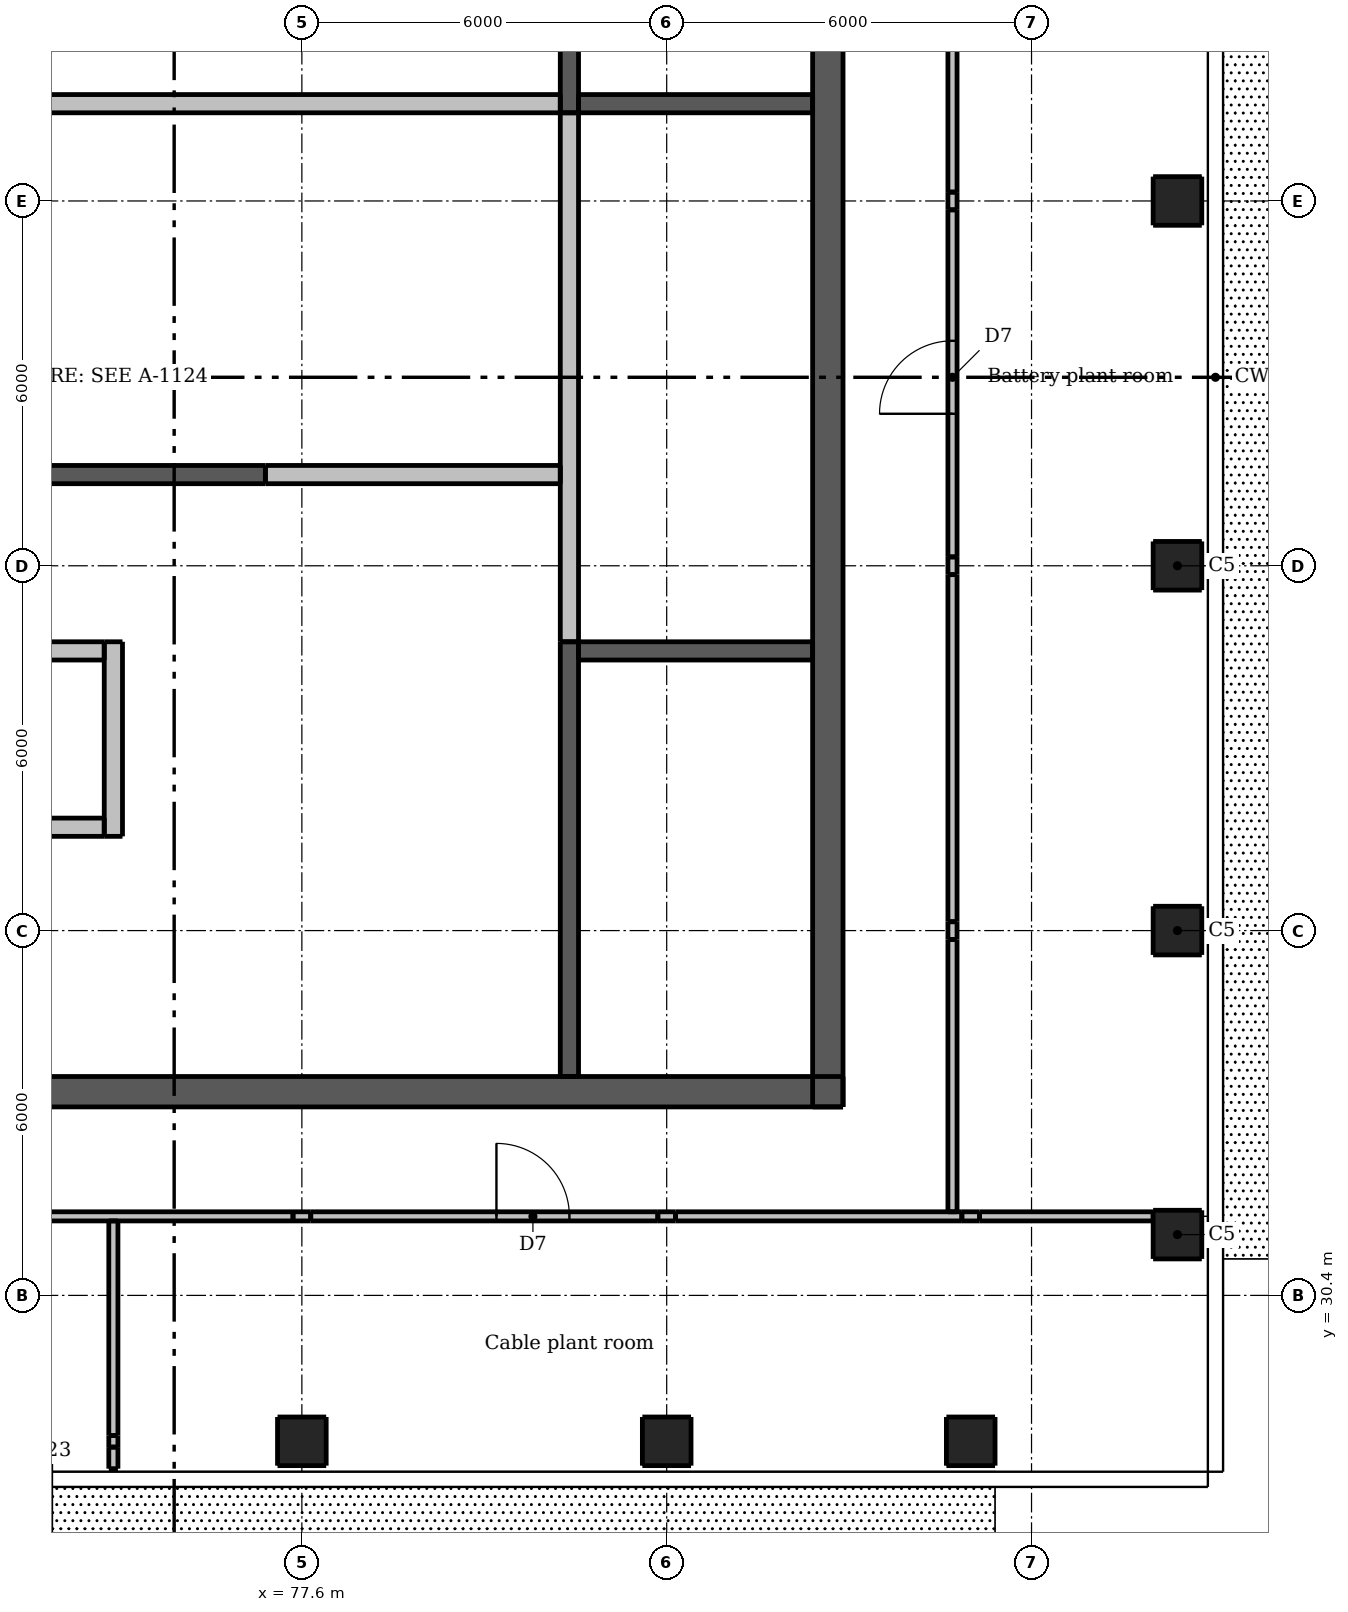
"""IFC4 building model, lengths in metres.
Left out: names, types, materials, properties, quantities, classifications, styles, units other than length and angle.
Written with IfcOpenShell. Run it as: python <this file> out.ifc"""

import sys

from ifc_helpers import new_model, si_unit, direction, frame, frame_2d, origin, origin_2d, place, context, subcontext, project, spatial, rectangle, extrude, element, fill, save


model = new_model("IFC4")
c1 = context("Model", 3, precision=1e-05, world=origin(), true_north=direction((0.0, 1.0)))
c2 = subcontext(c1, "Body", "Model", "MODEL_VIEW")
j1 = project(units=[si_unit("LENGTHUNIT", "METRE"), si_unit("PLANEANGLEUNIT", "RADIAN")], contexts=[c1])
p1 = place(None, origin())
s1 = spatial("IfcSite", under=j1, at=p1, CompositionType="ELEMENT")
p2 = place(p1, origin())
s2 = spatial("IfcBuilding", under=s1, at=p2, CompositionType="ELEMENT")
p3 = place(p2, frame((0.0, 0.0, 290.8)))
s3 = spatial("IfcBuildingStorey", under=s2, at=p3, CompositionType="ELEMENT", Elevation=290.8)
p4 = place(p3, frame((62.5, 33.75, 0.0), z_axis=(0.0, 0.0, 1.0), x_axis=(1.0, 0.0, 0.0)))
e1 = element("IfcWall", 1, at=p4, inside=s3, PredefinedType="SHEAR", context=c2, shape_type="SweptSolid", body=[
    extrude(rectangle(XDim=24.0, YDim=0.5, at=frame_2d((12.0, 0.0))), origin(), (0.0, 0.0, 1.0), 3.3),
])
p5 = place(p4, frame((1.875, 0.0, 0.0)))
e2 = element("IfcOpeningElement", 2, at=p5, cuts=e1, PredefinedType="OPENING", context=c2, shape_type="SweptSolid", body=[
    extrude(rectangle(XDim=1.1, YDim=2.1, at=frame_2d((0.55, 1.05))), frame((0.0, 0.26, 0.0), z_axis=(0.0, -1.0, 0.0), x_axis=(1.0, 0.0, 0.0)), (0.0, 0.0, 1.0), 0.52),
])
p6 = place(p4, frame((21.025, 0.0, 0.0)))
e3 = element("IfcOpeningElement", 3, at=p6, cuts=e1, PredefinedType="OPENING", context=c2, shape_type="SweptSolid", body=[
    extrude(rectangle(XDim=1.1, YDim=2.1, at=frame_2d((0.55, 1.05))), frame((0.0, 0.26, 0.0), z_axis=(0.0, -1.0, 0.0), x_axis=(1.0, 0.0, 0.0)), (0.0, 0.0, 1.0), 0.52),
])
p7 = place(p4, frame((11.55, 0.0, 0.0)))
e4 = element("IfcOpeningElement", 4, at=p7, cuts=e1, PredefinedType="OPENING", context=c2, shape_type="SweptSolid", body=[
    extrude(rectangle(XDim=0.9, YDim=2.1, at=frame_2d((0.45, 1.05))), frame((0.0, 0.26, 0.0), z_axis=(0.0, -1.0, 0.0), x_axis=(1.0, 0.0, 0.0)), (0.0, 0.0, 1.0), 0.52),
])
p8 = place(p3, frame((86.25, 33.5, 0.0), z_axis=(0.0, 0.0, 1.0), x_axis=(0.0, 1.0, 0.0)))
e5 = element("IfcWall", 5, at=p8, inside=s3, PredefinedType="SHEAR", context=c2, shape_type="SweptSolid", body=[
    extrude(rectangle(XDim=24.0, YDim=0.5, at=frame_2d((12.0, 0.0))), origin(), (0.0, 0.0, 1.0), 3.3),
])
p9 = place(p8, frame((11.55, 0.0, 0.0)))
e6 = element("IfcOpeningElement", 6, at=p9, cuts=e5, PredefinedType="OPENING", context=c2, shape_type="SweptSolid", body=[
    extrude(rectangle(XDim=0.9, YDim=2.1, at=frame_2d((0.45, 1.05))), frame((0.0, 0.26, 0.0), z_axis=(0.0, -1.0, 0.0), x_axis=(1.0, 0.0, 0.0)), (0.0, 0.0, 1.0), 0.52),
])
p10 = place(p3, frame((72.0, 43.9, 0.0), z_axis=(0.0, 0.0, 1.0), x_axis=(1.0, 0.0, 0.0)))
e7 = element("IfcWall", 7, at=p10, inside=s3, PredefinedType="SHEAR", context=c2, shape_type="SweptSolid", body=[
    extrude(rectangle(XDim=5.0, YDim=0.3, at=frame_2d((2.5, 0.0))), origin(), (0.0, 0.0, 1.0), 3.3),
])
for number, where, z_axis, x_axis in (
    (8, (77.6, 28.0, 0.0), (0.0, 0.0, 1.0), (1.0, 0.0, 0.0)),
    (9, (83.6, 28.0, 0.0), (0.0, 0.0, 1.0), (1.0, 0.0, 0.0)),
    (10, (88.6, 28.0, 0.0), (0.0, 0.0, 1.0), (1.0, 0.0, 0.0)),
    (11, (92.0, 31.4, 0.0), (0.0, 0.0, 1.0), (1.0, 0.0, 0.0)),
    (12, (92.0, 36.4, 0.0), (0.0, 0.0, 1.0), (1.0, 0.0, 0.0)),
    (13, (92.0, 42.4, 0.0), (0.0, 0.0, 1.0), (1.0, 0.0, 0.0)),
    (14, (92.0, 48.4, 0.0), (0.0, 0.0, 1.0), (1.0, 0.0, 0.0)),
):
    element("IfcColumn", number, at=place(p3, frame(where, z_axis=z_axis, x_axis=x_axis)), inside=s3, PredefinedType="COLUMN", context=c2, shape_type="SweptSolid", body=[
        extrude(rectangle(XDim=0.8, YDim=0.8, at=origin_2d()), origin(), (0.0, 0.0, 1.0), 3.3),
    ])
p11 = place(p3, frame((82.0, 34.0, 0.0), z_axis=(0.0, 0.0, 1.0), x_axis=(0.0, 1.0, 0.0)))
e15 = element("IfcWall", 15, at=p11, inside=s3, PredefinedType="SHEAR", context=c2, shape_type="SweptSolid", body=[
    extrude(rectangle(XDim=7.15, YDim=0.3, at=frame_2d((3.575, 0.0))), origin(), (0.0, 0.0, 1.0), 3.3),
])
p12 = place(p11, frame((0.2, 0.0, 0.0)))
e16 = element("IfcOpeningElement", 16, at=p12, cuts=e15, PredefinedType="OPENING", context=c2, shape_type="SweptSolid", body=[
    extrude(rectangle(XDim=1.1, YDim=2.1, at=frame_2d((0.55, 1.05))), frame((0.0, 0.16, 0.0), z_axis=(0.0, -1.0, 0.0), x_axis=(1.0, 0.0, 0.0)), (0.0, 0.0, 1.0), 0.32),
])
p13 = place(p3, frame((82.0, 41.15, 0.0), z_axis=(0.0, 0.0, 1.0), x_axis=(0.0, 1.0, 0.0)))
e17 = element("IfcWall", 17, at=p13, inside=s3, PredefinedType="PARTITIONING", context=c2, shape_type="SweptSolid", body=[
    extrude(rectangle(XDim=8.7, YDim=0.3, at=frame_2d((4.35, 0.0))), origin(), (0.0, 0.0, 1.0), 3.3),
])
p14 = place(p13, frame((3.9, 0.0, 0.0)))
e18 = element("IfcOpeningElement", 18, at=p14, cuts=e17, PredefinedType="OPENING", context=c2, shape_type="SweptSolid", body=[
    extrude(rectangle(XDim=0.9, YDim=2.1, at=frame_2d((0.45, 1.05))), frame((0.0, 0.16, 0.0), z_axis=(0.0, -1.0, 0.0), x_axis=(1.0, 0.0, 0.0)), (0.0, 0.0, 1.0), 0.32),
])
p15 = place(p3, frame((82.0, 49.85, 0.0), z_axis=(0.0, 0.0, 1.0), x_axis=(0.0, 1.0, 0.0)))
e19 = element("IfcWall", 19, at=p15, inside=s3, PredefinedType="SHEAR", context=c2, shape_type="SweptSolid", body=[
    extrude(rectangle(XDim=7.15, YDim=0.3, at=frame_2d((3.575, 0.0))), origin(), (0.0, 0.0, 1.0), 3.3),
])
p16 = place(p15, frame((5.85, 0.0, 0.0)))
e20 = element("IfcOpeningElement", 20, at=p16, cuts=e19, PredefinedType="OPENING", context=c2, shape_type="SweptSolid", body=[
    extrude(rectangle(XDim=1.1, YDim=2.1, at=frame_2d((0.55, 1.05))), frame((0.0, 0.16, 0.0), z_axis=(0.0, -1.0, 0.0), x_axis=(1.0, 0.0, 0.0)), (0.0, 0.0, 1.0), 0.32),
])
for number, where, z_axis, x_axis in (
    (21, (82.15, 41.0, 0.0), (0.0, 0.0, 1.0), (1.0, 0.0, 0.0)),
    (22, (82.15, 50.0, 0.0), (0.0, 0.0, 1.0), (1.0, 0.0, 0.0)),
):
    element("IfcWall", number, at=place(p3, frame(where, z_axis=z_axis, x_axis=x_axis)), inside=s3, PredefinedType="SHEAR", context=c2, shape_type="SweptSolid", body=[
        extrude(rectangle(XDim=3.85, YDim=0.3, at=frame_2d((1.925, 0.0))), origin(), (0.0, 0.0, 1.0), 3.3),
    ])
p17 = place(p3, frame((67.15, 50.0, 0.0), z_axis=(0.0, 0.0, 1.0), x_axis=(1.0, 0.0, 0.0)))
e23 = element("IfcWall", 23, at=p17, inside=s3, PredefinedType="PARTITIONING", context=c2, shape_type="SweptSolid", body=[
    extrude(rectangle(XDim=14.7, YDim=0.3, at=frame_2d((7.35, 0.0))), origin(), (0.0, 0.0, 1.0), 3.3),
])
p18 = place(p17, frame((6.9, 0.0, 0.0)))
e24 = element("IfcOpeningElement", 24, at=p18, cuts=e23, PredefinedType="OPENING", context=c2, shape_type="SweptSolid", body=[
    extrude(rectangle(XDim=0.9, YDim=2.1, at=frame_2d((0.45, 1.05))), frame((0.0, 0.16, 0.0), z_axis=(0.0, -1.0, 0.0), x_axis=(1.0, 0.0, 0.0)), (0.0, 0.0, 1.0), 0.32),
])
p19 = place(p3, frame((77.0, 43.9, 0.0), z_axis=(0.0, 0.0, 1.0), x_axis=(1.0, 0.0, 0.0)))
e25 = element("IfcWall", 25, at=p19, inside=s3, PredefinedType="PARTITIONING", context=c2, shape_type="SweptSolid", body=[
    extrude(rectangle(XDim=4.85, YDim=0.3, at=frame_2d((2.425, 0.0))), origin(), (0.0, 0.0, 1.0), 3.3),
])
p20 = place(p3, frame((67.15, 38.1, 0.0), z_axis=(0.0, 0.0, 1.0), x_axis=(1.0, 0.0, 0.0)))
e26 = element("IfcWall", 26, at=p20, inside=s3, PredefinedType="PARTITIONING", context=c2, shape_type="SweptSolid", body=[
    extrude(rectangle(XDim=7.2, YDim=0.3, at=frame_2d((3.6, 0.0))), origin(), (0.0, 0.0, 1.0), 3.3),
])
p21 = place(p20, frame((0.55, 0.0, 0.0)))
e27 = element("IfcOpeningElement", 27, at=p21, cuts=e26, PredefinedType="OPENING", context=c2, shape_type="SweptSolid", body=[
    extrude(rectangle(XDim=1.1, YDim=2.1, at=frame_2d((0.55, 1.05))), frame((0.0, 0.16, 0.0), z_axis=(0.0, -1.0, 0.0), x_axis=(1.0, 0.0, 0.0)), (0.0, 0.0, 1.0), 0.32),
])
p22 = place(p20, frame((3.05, 0.0, 0.0)))
e28 = element("IfcOpeningElement", 28, at=p22, cuts=e26, PredefinedType="OPENING", context=c2, shape_type="SweptSolid", body=[
    extrude(rectangle(XDim=1.1, YDim=2.1, at=frame_2d((0.55, 1.05))), frame((0.0, 0.16, 0.0), z_axis=(0.0, -1.0, 0.0), x_axis=(1.0, 0.0, 0.0)), (0.0, 0.0, 1.0), 0.32),
])
p23 = place(p20, frame((5.5, 0.0, 0.0)))
e29 = element("IfcOpeningElement", 29, at=p23, cuts=e26, PredefinedType="OPENING", context=c2, shape_type="SweptSolid", body=[
    extrude(rectangle(XDim=1.2, YDim=2.1, at=frame_2d((0.6, 1.05))), frame((0.0, 0.16, 0.0), z_axis=(0.0, -1.0, 0.0), x_axis=(1.0, 0.0, 0.0)), (0.0, 0.0, 1.0), 0.32),
])
p24 = place(p3, frame((67.15, 41.0, 0.0), z_axis=(0.0, 0.0, 1.0), x_axis=(1.0, 0.0, 0.0)))
e30 = element("IfcWall", 30, at=p24, inside=s3, PredefinedType="PARTITIONING", context=c2, shape_type="SweptSolid", body=[
    extrude(rectangle(XDim=7.2, YDim=0.3, at=frame_2d((3.6, 0.0))), origin(), (0.0, 0.0, 1.0), 3.3),
])
p25 = place(p3, frame((74.5, 37.95, 0.0), z_axis=(0.0, 0.0, 1.0), x_axis=(0.0, 1.0, 0.0)))
e31 = element("IfcWall", 31, at=p25, inside=s3, PredefinedType="PARTITIONING", context=c2, shape_type="SweptSolid", body=[
    extrude(rectangle(XDim=3.2, YDim=0.3, at=frame_2d((1.6, 0.0))), origin(), (0.0, 0.0, 1.0), 3.3),
])
p26 = place(p3, frame((71.746, 31.7, 0.0), z_axis=(0.0, 0.0, 1.0), x_axis=(1.0, 0.0, 0.0)))
e32 = element("IfcWall", 32, at=p26, inside=s3, PredefinedType="PARTITIONING", context=c2, shape_type="SweptSolid", body=[
    extrude(rectangle(XDim=5.708, YDim=0.15, at=frame_2d((2.854, 0.0))), origin(), (0.0, 0.0, 1.0), 3.3),
])
p27 = place(p3, frame((77.454, 31.7, 0.0), z_axis=(0.0, 0.0, 1.0), x_axis=(1.0, 0.0, 0.0)))
e33 = element("IfcWall", 33, at=p27, inside=s3, PredefinedType="PARTITIONING", context=c2, shape_type="SweptSolid", body=[
    extrude(rectangle(XDim=0.292, YDim=0.15, at=frame_2d((0.146, 0.0))), origin(), (0.0, 0.0, 1.0), 2.465),
])
p28 = place(p3, frame((77.746, 31.7, 0.0), z_axis=(0.0, 0.0, 1.0), x_axis=(1.0, 0.0, 0.0)))
e34 = element("IfcWall", 34, at=p28, inside=s3, PredefinedType="PARTITIONING", context=c2, shape_type="SweptSolid", body=[
    extrude(rectangle(XDim=5.708, YDim=0.15, at=frame_2d((2.854, 0.0))), origin(), (0.0, 0.0, 1.0), 3.3),
])
p29 = place(p28, frame((3.054, 0.0, 0.0)))
e35 = element("IfcOpeningElement", 35, at=p29, cuts=e34, PredefinedType="OPENING", context=c2, shape_type="SweptSolid", body=[
    extrude(rectangle(XDim=1.2, YDim=2.1, at=frame_2d((0.6, 1.05))), frame((0.0, 0.085, 0.0), z_axis=(0.0, -1.0, 0.0), x_axis=(1.0, 0.0, 0.0)), (0.0, 0.0, 1.0), 0.17),
])
p30 = place(p3, frame((83.454, 31.7, 0.0), z_axis=(0.0, 0.0, 1.0), x_axis=(1.0, 0.0, 0.0)))
e36 = element("IfcWall", 36, at=p30, inside=s3, PredefinedType="PARTITIONING", context=c2, shape_type="SweptSolid", body=[
    extrude(rectangle(XDim=0.292, YDim=0.15, at=frame_2d((0.146, 0.0))), origin(), (0.0, 0.0, 1.0), 2.465),
])
p31 = place(p3, frame((83.746, 31.7, 0.0), z_axis=(0.0, 0.0, 1.0), x_axis=(1.0, 0.0, 0.0)))
e37 = element("IfcWall", 37, at=p31, inside=s3, PredefinedType="PARTITIONING", context=c2, shape_type="SweptSolid", body=[
    extrude(rectangle(XDim=4.708, YDim=0.15, at=frame_2d((2.354, 0.0))), origin(), (0.0, 0.0, 1.0), 3.3),
])
p32 = place(p3, frame((88.454, 31.7, 0.0), z_axis=(0.0, 0.0, 1.0), x_axis=(1.0, 0.0, 0.0)))
e38 = element("IfcWall", 38, at=p32, inside=s3, PredefinedType="PARTITIONING", context=c2, shape_type="SweptSolid", body=[
    extrude(rectangle(XDim=0.292, YDim=0.15, at=frame_2d((0.146, 0.0))), origin(), (0.0, 0.0, 1.0), 2.462),
])
p33 = place(p3, frame((88.746, 31.7, 0.0), z_axis=(0.0, 0.0, 1.0), x_axis=(1.0, 0.0, 0.0)))
e39 = element("IfcWall", 39, at=p33, inside=s3, PredefinedType="PARTITIONING", context=c2, shape_type="SweptSolid", body=[
    extrude(rectangle(XDim=2.854, YDim=0.15, at=frame_2d((1.427, 0.0))), origin(), (0.0, 0.0, 1.0), 3.3),
])
p34 = place(p3, frame((74.5, 27.55, 0.0), z_axis=(0.0, 0.0, 1.0), x_axis=(0.0, 1.0, 0.0)))
e40 = element("IfcWall", 40, at=p34, inside=s3, PredefinedType="PARTITIONING", context=c2, shape_type="SweptSolid", body=[
    extrude(rectangle(XDim=0.355, YDim=0.15, at=frame_2d((0.177, 0.0))), origin(), (0.0, 0.0, 1.0), 3.3),
])
p35 = place(p3, frame((74.5, 27.905, 0.0), z_axis=(0.0, 0.0, 1.0), x_axis=(0.0, 1.0, 0.0)))
e41 = element("IfcWall", 41, at=p35, inside=s3, PredefinedType="PARTITIONING", context=c2, shape_type="SweptSolid", body=[
    extrude(rectangle(XDim=0.19, YDim=0.15, at=frame_2d((0.095, 0.0))), origin(), (0.0, 0.0, 1.0), 2.847),
])
p36 = place(p3, frame((74.5, 28.095, 0.0), z_axis=(0.0, 0.0, 1.0), x_axis=(0.0, 1.0, 0.0)))
e42 = element("IfcWall", 42, at=p36, inside=s3, PredefinedType="PARTITIONING", context=c2, shape_type="SweptSolid", body=[
    extrude(rectangle(XDim=3.53, YDim=0.15, at=frame_2d((1.765, 0.0))), origin(), (0.0, 0.0, 1.0), 3.3),
])
p37 = place(p3, frame((88.3, 31.775, 0.0), z_axis=(0.0, 0.0, 1.0), x_axis=(0.0, 1.0, 0.0)))
e43 = element("IfcWall", 43, at=p37, inside=s3, PredefinedType="PARTITIONING", context=c2, shape_type="SweptSolid", body=[
    extrude(rectangle(XDim=4.479, YDim=0.15, at=frame_2d((2.24, 0.0))), origin(), (0.0, 0.0, 1.0), 3.3),
])
p38 = place(p3, frame((88.3, 36.254, 0.0), z_axis=(0.0, 0.0, 1.0), x_axis=(0.0, 1.0, 0.0)))
e44 = element("IfcWall", 44, at=p38, inside=s3, PredefinedType="PARTITIONING", context=c2, shape_type="SweptSolid", body=[
    extrude(rectangle(XDim=0.292, YDim=0.15, at=frame_2d((0.146, 0.0))), origin(), (0.0, 0.0, 1.0), 2.459),
])
p39 = place(p3, frame((88.3, 36.546, 0.0), z_axis=(0.0, 0.0, 1.0), x_axis=(0.0, 1.0, 0.0)))
e45 = element("IfcWall", 45, at=p39, inside=s3, PredefinedType="PARTITIONING", context=c2, shape_type="SweptSolid", body=[
    extrude(rectangle(XDim=5.708, YDim=0.15, at=frame_2d((2.854, 0.0))), origin(), (0.0, 0.0, 1.0), 3.3),
])
p40 = place(p3, frame((88.3, 42.254, 0.0), z_axis=(0.0, 0.0, 1.0), x_axis=(0.0, 1.0, 0.0)))
e46 = element("IfcWall", 46, at=p40, inside=s3, PredefinedType="PARTITIONING", context=c2, shape_type="SweptSolid", body=[
    extrude(rectangle(XDim=0.292, YDim=0.15, at=frame_2d((0.146, 0.0))), origin(), (0.0, 0.0, 1.0), 2.465),
])
p41 = place(p3, frame((88.3, 42.546, 0.0), z_axis=(0.0, 0.0, 1.0), x_axis=(0.0, 1.0, 0.0)))
e47 = element("IfcWall", 47, at=p41, inside=s3, PredefinedType="PARTITIONING", context=c2, shape_type="SweptSolid", body=[
    extrude(rectangle(XDim=5.708, YDim=0.15, at=frame_2d((2.854, 0.0))), origin(), (0.0, 0.0, 1.0), 3.3),
])
p42 = place(p41, frame((2.354, 0.0, 0.0)))
e48 = element("IfcOpeningElement", 48, at=p42, cuts=e47, PredefinedType="OPENING", context=c2, shape_type="SweptSolid", body=[
    extrude(rectangle(XDim=1.2, YDim=2.1, at=frame_2d((0.6, 1.05))), frame((0.0, 0.085, 0.0), z_axis=(0.0, -1.0, 0.0), x_axis=(1.0, 0.0, 0.0)), (0.0, 0.0, 1.0), 0.17),
])
p43 = place(p3, frame((88.3, 48.254, 0.0), z_axis=(0.0, 0.0, 1.0), x_axis=(0.0, 1.0, 0.0)))
e49 = element("IfcWall", 49, at=p43, inside=s3, PredefinedType="PARTITIONING", context=c2, shape_type="SweptSolid", body=[
    extrude(rectangle(XDim=0.292, YDim=0.15, at=frame_2d((0.146, 0.0))), origin(), (0.0, 0.0, 1.0), 2.465),
])
p44 = place(p3, frame((88.3, 48.546, 0.0), z_axis=(0.0, 0.0, 1.0), x_axis=(0.0, 1.0, 0.0)))
e50 = element("IfcWall", 50, at=p44, inside=s3, PredefinedType="PARTITIONING", context=c2, shape_type="SweptSolid", body=[
    extrude(rectangle(XDim=5.708, YDim=0.15, at=frame_2d((2.854, 0.0))), origin(), (0.0, 0.0, 1.0), 3.3),
])
p45 = place(p12, origin())
e51 = element("IfcDoor", 51, at=p45, inside=s3, OperationType="SINGLE_SWING_RIGHT", PredefinedType="DOOR", context=c2, shape_type="SweptSolid", body=[
    extrude(rectangle(XDim=1.1, YDim=2.1, at=frame_2d((0.55, 1.05))), frame((0.0, -0.087, 0.0), z_axis=(0.0, -1.0, 0.0), x_axis=(1.0, 0.0, 0.0)), (0.0, 0.0, 1.0), 0.05),
])
fill(e16, e51)
p46 = place(p18, origin())
e52 = element("IfcDoor", 52, at=p46, inside=s3, OperationType="SINGLE_SWING_RIGHT", PredefinedType="DOOR", context=c2, shape_type="SweptSolid", body=[
    extrude(rectangle(XDim=0.9, YDim=2.1, at=frame_2d((0.45, 1.05))), frame((0.0, -0.087, 0.0), z_axis=(0.0, -1.0, 0.0), x_axis=(1.0, 0.0, 0.0)), (0.0, 0.0, 1.0), 0.05),
])
fill(e24, e52)
p47 = place(p14, origin())
e53 = element("IfcDoor", 53, at=p47, inside=s3, OperationType="SINGLE_SWING_RIGHT", PredefinedType="DOOR", context=c2, shape_type="SweptSolid", body=[
    extrude(rectangle(XDim=0.9, YDim=2.1, at=frame_2d((0.45, 1.05))), frame((0.0, -0.087, 0.0), z_axis=(0.0, -1.0, 0.0), x_axis=(1.0, 0.0, 0.0)), (0.0, 0.0, 1.0), 0.05),
])
fill(e18, e53)
p48 = place(p6, origin())
e54 = element("IfcDoor", 54, at=p48, inside=s3, OperationType="SINGLE_SWING_RIGHT", PredefinedType="DOOR", context=c2, shape_type="SweptSolid", body=[
    extrude(rectangle(XDim=1.1, YDim=2.1, at=frame_2d((0.55, 1.05))), frame((0.0, 0.237, 0.0), z_axis=(0.0, -1.0, 0.0), x_axis=(1.0, 0.0, 0.0)), (0.0, 0.0, 1.0), 0.05),
])
fill(e3, e54)
p49 = place(p7, origin())
e55 = element("IfcDoor", 55, at=p49, inside=s3, OperationType="SINGLE_SWING_LEFT", PredefinedType="DOOR", context=c2, shape_type="SweptSolid", body=[
    extrude(rectangle(XDim=0.9, YDim=2.1, at=frame_2d((0.45, 1.05))), frame((0.0, 0.237, 0.0), z_axis=(0.0, -1.0, 0.0), x_axis=(1.0, 0.0, 0.0)), (0.0, 0.0, 1.0), 0.05),
])
fill(e4, e55)
p50 = place(p9, origin())
e56 = element("IfcDoor", 56, at=p50, inside=s3, OperationType="SINGLE_SWING_RIGHT", PredefinedType="DOOR", context=c2, shape_type="SweptSolid", body=[
    extrude(rectangle(XDim=0.9, YDim=2.1, at=frame_2d((0.45, 1.05))), frame((0.0, 0.237, 0.0), z_axis=(0.0, -1.0, 0.0), x_axis=(1.0, 0.0, 0.0)), (0.0, 0.0, 1.0), 0.05),
])
fill(e6, e56)
p51 = place(p23, origin())
e57 = element("IfcDoor", 57, at=p51, inside=s3, OperationType="DOUBLE_DOOR_SLIDING", PredefinedType="DOOR", context=c2, shape_type="SweptSolid", body=[
    extrude(rectangle(XDim=1.2, YDim=2.1, at=frame_2d((0.6, 1.05))), frame((0.0, 0.025, 0.0), z_axis=(0.0, -1.0, 0.0), x_axis=(1.0, 0.0, 0.0)), (0.0, 0.0, 1.0), 0.05),
])
fill(e29, e57)
p52 = place(p29, origin())
e58 = element("IfcDoor", 58, at=p52, inside=s3, OperationType="SINGLE_SWING_LEFT", PredefinedType="DOOR", context=c2, shape_type="SweptSolid", body=[
    extrude(rectangle(XDim=1.2, YDim=2.1, at=frame_2d((0.6, 1.05))), frame((0.0, 0.025, 0.0), z_axis=(0.0, -1.0, 0.0), x_axis=(1.0, 0.0, 0.0)), (0.0, 0.0, 1.0), 0.05),
])
fill(e35, e58)
p53 = place(p42, origin())
e59 = element("IfcDoor", 59, at=p53, inside=s3, OperationType="SINGLE_SWING_LEFT", PredefinedType="DOOR", context=c2, shape_type="SweptSolid", body=[
    extrude(rectangle(XDim=1.2, YDim=2.1, at=frame_2d((0.6, 1.05))), frame((0.0, 0.025, 0.0), z_axis=(0.0, -1.0, 0.0), x_axis=(1.0, 0.0, 0.0)), (0.0, 0.0, 1.0), 0.05),
])
fill(e48, e59)
save(model, sys.argv[1])
